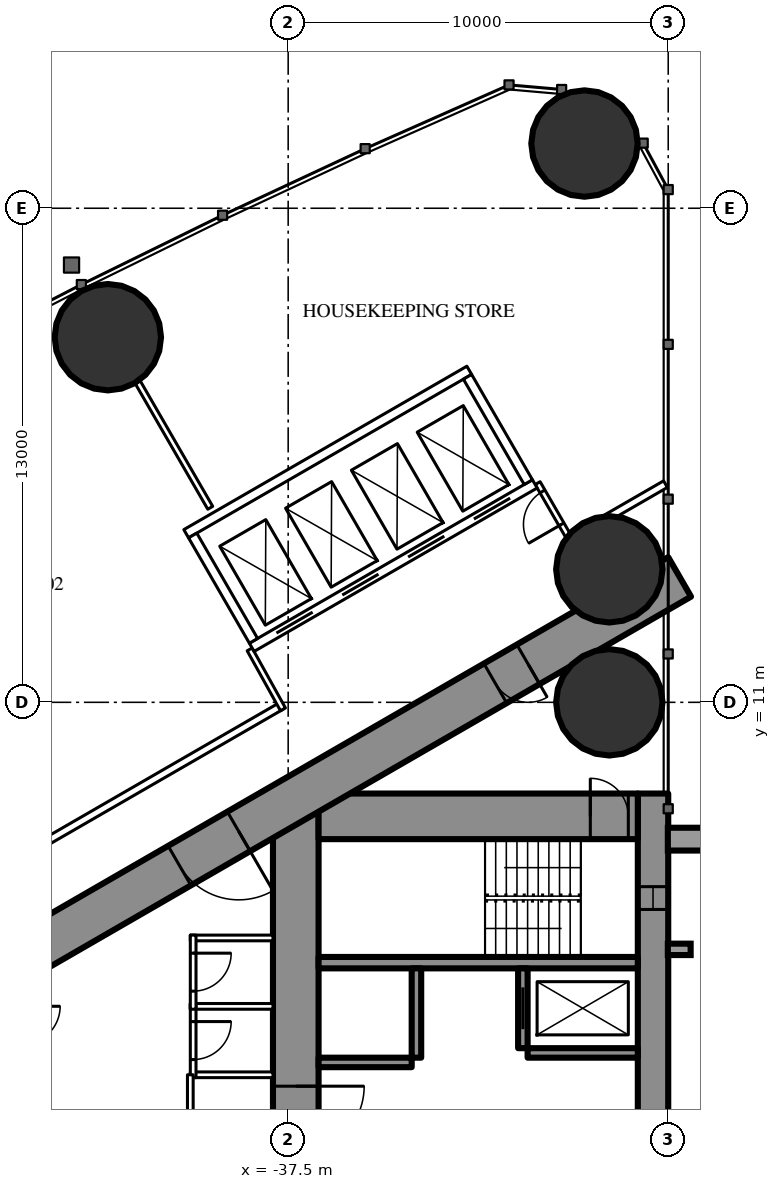
"""IFC4 building model, lengths in metres.
Left out: names, types, materials, properties, quantities, classifications, styles, units other than length and angle.
Written with IfcOpenShell. Run it as: python <this file> out.ifc"""

import sys

from ifc_helpers import new_model, si_unit, direction, frame, frame_2d, origin, origin_2d, place, context, subcontext, project, spatial, rectangle, hollow_circle, extrude, element, fill, save


model = new_model("IFC4")
c1 = context("Model", 3, precision=1e-05, world=origin(), true_north=direction((0.0, 1.0)))
c2 = subcontext(c1, "Body", "Model", "MODEL_VIEW")
j1 = project(units=[si_unit("LENGTHUNIT", "METRE"), si_unit("PLANEANGLEUNIT", "RADIAN")], contexts=[c1])
p1 = place(None, origin())
s1 = spatial("IfcSite", under=j1, at=p1, CompositionType="ELEMENT")
p2 = place(p1, origin())
s2 = spatial("IfcBuilding", under=s1, at=p2, CompositionType="ELEMENT")
p3 = place(p2, frame((0.0, 0.0, 21.5)))
s3 = spatial("IfcBuildingStorey", under=s2, at=p3, CompositionType="ELEMENT", Elevation=21.5)
for number, where, z_axis, x_axis in (
    (1, (-29.703, 25.703, 0.0), (0.0, 0.0, 1.0), (1.0, 0.0, 0.0)),
    (2, (-29.05, 11.0, 0.0), (0.0, 0.0, 1.0), (1.0, 0.0, 0.0)),
    (3, (-29.05, 14.5, 0.0), (0.0, 0.0, 1.0), (1.0, 0.0, 0.0)),
    (4, (-42.245, 20.607, 0.0), (0.0, 0.0, 1.0), (1.0, 0.0, 0.0)),
):
    element("IfcColumn", number, at=place(p3, frame(where, z_axis=z_axis, x_axis=x_axis)), inside=s3, PredefinedType="COLUMN", context=c2, shape_type="SweptSolid", body=[
        extrude(hollow_circle(Radius=1.4, WallThickness=0.12, at=origin_2d()), origin(), (0.0, 0.0, 1.0), 3.5),
    ])
p4 = place(p3, frame((-27.9, 8.6, 0.0), z_axis=(0.0, 0.0, 1.0), x_axis=(0.0, -1.0, 0.0)))
e5 = element("IfcWall", 5, at=p4, inside=s3, PredefinedType="SHEAR", context=c2, shape_type="SweptSolid", body=[
    extrude(rectangle(XDim=17.2, YDim=0.8, at=frame_2d((8.6, 0.0))), origin(), (0.0, 0.0, 1.0), 3.5),
])
p5 = place(p4, frame((2.45, 0.0, 0.6)))
e6 = element("IfcOpeningElement", 6, at=p5, cuts=e5, PredefinedType="OPENING", context=c2, shape_type="SweptSolid", body=[
    extrude(rectangle(XDim=0.6, YDim=2.1, at=frame_2d((0.3, 1.05))), frame((0.0, 0.41, 0.0), z_axis=(0.0, -1.0, 0.0), x_axis=(1.0, 0.0, 0.0)), (0.0, 0.0, 1.0), 0.82),
])
p6 = place(p4, frame((14.15, 0.0, 0.6)))
e7 = element("IfcOpeningElement", 7, at=p6, cuts=e5, PredefinedType="OPENING", context=c2, shape_type="SweptSolid", body=[
    extrude(rectangle(XDim=0.6, YDim=2.1, at=frame_2d((0.3, 1.05))), frame((0.0, 0.41, 0.0), z_axis=(0.0, -1.0, 0.0), x_axis=(1.0, 0.0, 0.0)), (0.0, 0.0, 1.0), 0.82),
])
p7 = place(p3, frame((-37.3, 8.6, 0.0), z_axis=(0.0, 0.0, 1.0), x_axis=(0.0, -1.0, 0.0)))
e8 = element("IfcWall", 8, at=p7, inside=s3, PredefinedType="SHEAR", context=c2, shape_type="SweptSolid", body=[
    extrude(rectangle(XDim=17.2, YDim=1.2, at=frame_2d((8.6, 0.0))), origin(), (0.0, 0.0, 1.0), 3.5),
])
p8 = place(p7, frame((7.7, 0.0, 0.0)))
e9 = element("IfcOpeningElement", 9, at=p8, cuts=e8, PredefinedType="OPENING", context=c2, shape_type="SweptSolid", body=[
    extrude(rectangle(XDim=1.8, YDim=2.2, at=frame_2d((0.9, 1.1))), frame((0.0, 0.61, 0.0), z_axis=(0.0, -1.0, 0.0), x_axis=(1.0, 0.0, 0.0)), (0.0, 0.0, 1.0), 1.22),
])
p9 = place(p3, frame((-28.3, 8.0, 0.0), z_axis=(0.0, 0.0, 1.0), x_axis=(-1.0, 0.0, 0.0)))
e10 = element("IfcWall", 10, at=p9, inside=s3, PredefinedType="SHEAR", context=c2, shape_type="SweptSolid", body=[
    extrude(rectangle(XDim=8.4, YDim=1.2, at=frame_2d((4.2, 0.0))), origin(), (0.0, 0.0, 1.0), 3.5),
])
p10 = place(p9, frame((0.25, 0.0, 0.0)))
e11 = element("IfcOpeningElement", 11, at=p10, cuts=e10, PredefinedType="OPENING", context=c2, shape_type="SweptSolid", body=[
    extrude(rectangle(XDim=1.0, YDim=2.2, at=frame_2d((0.5, 1.1))), frame((0.0, 0.61, 0.0), z_axis=(0.0, -1.0, 0.0), x_axis=(1.0, 0.0, 0.0)), (0.0, 0.0, 1.0), 1.22),
])
p11 = place(p3, frame((-28.3, 4.15, 0.0), z_axis=(0.0, 0.0, 1.0), x_axis=(-1.0, 0.0, 0.0)))
e12 = element("IfcWall", 12, at=p11, inside=s3, PredefinedType="SHEAR", context=c2, shape_type="SweptSolid", body=[
    extrude(rectangle(XDim=8.4, YDim=0.3, at=frame_2d((4.2, 0.0))), origin(), (0.0, 0.0, 1.0), 3.5),
])
p12 = place(p3, frame((-31.325, 4.0, 0.0), z_axis=(0.0, 0.0, 1.0), x_axis=(0.0, -1.0, 0.0)))
e13 = element("IfcWall", 13, at=p12, inside=s3, PredefinedType="SHEAR", context=c2, shape_type="SweptSolid", body=[
    extrude(rectangle(XDim=2.1, YDim=0.25, at=frame_2d((1.05, 0.0))), origin(), (0.0, 0.0, 1.0), 3.5),
])
p13 = place(p12, frame((0.5, 0.0, 0.0)))
e14 = element("IfcOpeningElement", 14, at=p13, cuts=e13, PredefinedType="OPENING", context=c2, shape_type="SweptSolid", body=[
    extrude(rectangle(XDim=1.1, YDim=2.2, at=frame_2d((0.55, 1.1))), frame((0.0, 0.135, 0.0), z_axis=(0.0, -1.0, 0.0), x_axis=(1.0, 0.0, 0.0)), (0.0, 0.0, 1.0), 0.27),
])
p14 = place(p3, frame((-34.125, 4.0, 0.0), z_axis=(0.0, 0.0, 1.0), x_axis=(0.0, -1.0, 0.0)))
e15 = element("IfcWall", 15, at=p14, inside=s3, PredefinedType="SHEAR", context=c2, shape_type="SweptSolid", body=[
    extrude(rectangle(XDim=2.35, YDim=0.25, at=frame_2d((1.175, 0.0))), origin(), (0.0, 0.0, 1.0), 3.5),
])
p15 = place(p3, frame((-28.3, 1.775, 0.0), z_axis=(0.0, 0.0, 1.0), x_axis=(-1.0, 0.0, 0.0)))
e16 = element("IfcWall", 16, at=p15, inside=s3, PredefinedType="SHEAR", context=c2, shape_type="SweptSolid", body=[
    extrude(rectangle(XDim=2.9, YDim=0.25, at=frame_2d((1.45, 0.0))), origin(), (0.0, 0.0, 1.0), 3.5),
])
p16 = place(p3, frame((-34.25, 1.525, 0.0), z_axis=(0.0, 0.0, 1.0), x_axis=(-1.0, 0.0, 0.0)))
e17 = element("IfcWall", 17, at=p16, inside=s3, PredefinedType="SHEAR", context=c2, shape_type="SweptSolid", body=[
    extrude(rectangle(XDim=2.45, YDim=0.25, at=frame_2d((1.225, 0.0))), origin(), (0.0, 0.0, 1.0), 3.5),
])
p17 = place(p3, frame((-27.2, 14.3, 0.0), z_axis=(0.0, 0.0, 1.0), x_axis=(-0.866026593062, -0.499997940104, 0.0)))
e18 = element("IfcWall", 18, at=p17, inside=s3, PredefinedType="SHEAR", context=c2, shape_type="SweptSolid", body=[
    extrude(rectangle(XDim=28.946, YDim=1.2, at=frame_2d((14.473, 0.0))), origin(), (0.0, 0.0, 1.0), 3.5),
])
p18 = place(p17, frame((4.6, 0.0, 0.0)))
e19 = element("IfcOpeningElement", 19, at=p18, cuts=e18, PredefinedType="OPENING", context=c2, shape_type="SweptSolid", body=[
    extrude(rectangle(XDim=1.0, YDim=2.2, at=frame_2d((0.5, 1.1))), frame((0.0, 0.61, 0.0), z_axis=(0.0, -1.0, 0.0), x_axis=(1.0, 0.0, 0.0)), (0.0, 0.0, 1.0), 1.22),
])
p19 = place(p17, frame((13.395, 0.0, 0.0)))
e20 = element("IfcOpeningElement", 20, at=p19, cuts=e18, PredefinedType="OPENING", context=c2, shape_type="SweptSolid", body=[
    extrude(rectangle(XDim=1.8, YDim=2.2, at=frame_2d((0.9, 1.1))), frame((0.0, 0.61, 0.0), z_axis=(0.0, -1.0, 0.0), x_axis=(1.0, 0.0, 0.0)), (0.0, 0.0, 1.0), 1.22),
])
p20 = place(p3, frame((-39.551, 16.119, 0.0), z_axis=(0.0, 0.0, 1.0), x_axis=(-0.500014214979, 0.866017196607, 0.0)))
e21 = element("IfcWall", 21, at=p20, inside=s3, PredefinedType="PARTITIONING", context=c2, shape_type="SweptSolid", body=[
    extrude(rectangle(XDim=3.815, YDim=0.15, at=frame_2d((1.907, 0.0))), origin(), (0.0, 0.0, 1.0), 3.25),
])
p21 = place(p3, frame((-27.572, 16.741, 0.0), z_axis=(0.0, 0.0, 1.0), x_axis=(-0.866034618596, -0.499984039138, 0.0)))
e22 = element("IfcWall", 22, at=p21, inside=s3, PredefinedType="PARTITIONING", context=c2, shape_type="SweptSolid", body=[
    extrude(rectangle(XDim=2.854, YDim=0.2, at=frame_2d((1.427, 0.0))), origin(), (0.0, 0.0, 1.0), 3.25),
])
p22 = place(p3, frame((-37.7, 10.894, 0.0), z_axis=(0.0, 0.0, 1.0), x_axis=(-0.866027905338, -0.499995667157, 0.0)))
e23 = element("IfcWall", 23, at=p22, inside=s3, PredefinedType="PARTITIONING", context=c2, shape_type="SweptSolid", body=[
    extrude(rectangle(XDim=21.787, YDim=0.2, at=frame_2d((10.894, 0.0))), origin(), (0.0, 0.0, 1.0), 3.25),
])
p23 = place(p22, frame((11.78, 0.0, 0.0)))
e24 = element("IfcOpeningElement", 24, at=p23, cuts=e23, PredefinedType="OPENING", context=c2, shape_type="SweptSolid", body=[
    extrude(rectangle(XDim=0.95, YDim=2.2, at=frame_2d((0.475, 1.1))), frame((0.0, 0.11, 0.0), z_axis=(0.0, -1.0, 0.0), x_axis=(1.0, 0.0, 0.0)), (0.0, 0.0, 1.0), 0.22),
])
p24 = place(p22, frame((7.73, 0.0, 0.0)))
e25 = element("IfcOpeningElement", 25, at=p24, cuts=e23, PredefinedType="OPENING", context=c2, shape_type="SweptSolid", body=[
    extrude(rectangle(XDim=0.95, YDim=2.2, at=frame_2d((0.475, 1.1))), frame((0.0, 0.11, 0.0), z_axis=(0.0, -1.0, 0.0), x_axis=(1.0, 0.0, 0.0)), (0.0, 0.0, 1.0), 0.22),
])
p25 = place(p3, frame((-38.513, 12.392, 0.0), z_axis=(0.0, 0.0, 1.0), x_axis=(0.485585508183, -0.874189175317, 0.0)))
e26 = element("IfcWall", 26, at=p25, inside=s3, PredefinedType="PARTITIONING", context=c2, shape_type="SweptSolid", body=[
    extrude(rectangle(XDim=1.805, YDim=0.15, at=frame_2d((0.902, 0.0))), origin(), (0.0, 0.0, 1.0), 3.25),
])
p26 = place(p3, frame((-30.033, 15.205, 0.0), z_axis=(0.0, 0.0, 1.0), x_axis=(-0.499980071345, 0.866036909293, 0.0)))
e27 = element("IfcWall", 27, at=p26, inside=s3, PredefinedType="PARTITIONING", context=c2, shape_type="SweptSolid", body=[
    extrude(rectangle(XDim=1.805, YDim=0.15, at=frame_2d((0.902, 0.0))), origin(), (0.0, 0.0, 1.0), 3.25),
])
p27 = place(p26, frame((0.552, 0.0, 0.0)))
e28 = element("IfcOpeningElement", 28, at=p27, cuts=e27, PredefinedType="OPENING", context=c2, shape_type="SweptSolid", body=[
    extrude(rectangle(XDim=1.0, YDim=2.2, at=frame_2d((0.5, 1.1))), frame((0.0, 0.085, 0.0), z_axis=(0.0, -1.0, 0.0), x_axis=(1.0, 0.0, 0.0)), (0.0, 0.0, 1.0), 0.17),
])
for number, where, z_axis, x_axis in (
    (29, (-37.9, 1.2, 0.0), (0.0, 0.0, 1.0), (-1.0, 0.0, 0.0)),
    (30, (-37.9, 3.0, 0.0), (0.0, 0.0, 1.0), (-1.0, 0.0, 0.0)),
    (31, (-37.9, 4.8, 0.0), (0.0, 0.0, 1.0), (-1.0, 0.0, 0.0)),
):
    element("IfcWall", number, at=place(p3, frame(where, z_axis=z_axis, x_axis=x_axis)), inside=s3, PredefinedType="PARTITIONING", context=c2, shape_type="SweptSolid", body=[
        extrude(rectangle(XDim=2.175, YDim=0.15, at=frame_2d((1.087, 0.0))), origin(), (0.0, 0.0, 1.0), 3.25),
    ])
p28 = place(p3, frame((-40.0, 3.075, 0.0), z_axis=(0.0, 0.0, 1.0), x_axis=(0.0, -1.0, 0.0)))
e32 = element("IfcWall", 32, at=p28, inside=s3, PredefinedType="PARTITIONING", context=c2, shape_type="SweptSolid", body=[
    extrude(rectangle(XDim=1.95, YDim=0.15, at=frame_2d((0.975, 0.0))), origin(), (0.0, 0.0, 1.0), 3.25),
])
p29 = place(p28, frame((0.475, 0.0, 0.0)))
e33 = element("IfcOpeningElement", 33, at=p29, cuts=e32, PredefinedType="OPENING", context=c2, shape_type="SweptSolid", body=[
    extrude(rectangle(XDim=1.0, YDim=2.2, at=frame_2d((0.5, 1.1))), frame((0.0, 0.085, 0.0), z_axis=(0.0, -1.0, 0.0), x_axis=(1.0, 0.0, 0.0)), (0.0, 0.0, 1.0), 0.17),
])
p30 = place(p3, frame((-40.0, 4.875, 0.0), z_axis=(0.0, 0.0, 1.0), x_axis=(0.0, -1.0, 0.0)))
e34 = element("IfcWall", 34, at=p30, inside=s3, PredefinedType="PARTITIONING", context=c2, shape_type="SweptSolid", body=[
    extrude(rectangle(XDim=1.95, YDim=0.15, at=frame_2d((0.975, 0.0))), origin(), (0.0, 0.0, 1.0), 3.25),
])
p31 = place(p30, frame((0.475, 0.0, 0.0)))
e35 = element("IfcOpeningElement", 35, at=p31, cuts=e34, PredefinedType="OPENING", context=c2, shape_type="SweptSolid", body=[
    extrude(rectangle(XDim=1.0, YDim=2.2, at=frame_2d((0.5, 1.1))), frame((0.0, 0.085, 0.0), z_axis=(0.0, -1.0, 0.0), x_axis=(1.0, 0.0, 0.0)), (0.0, 0.0, 1.0), 0.17),
])
p32 = place(p3, frame((-40.075, 1.2, 0.0), z_axis=(0.0, 0.0, 1.0), x_axis=(0.0, -1.0, 0.0)))
e36 = element("IfcWall", 36, at=p32, inside=s3, PredefinedType="PARTITIONING", context=c2, shape_type="SweptSolid", body=[
    extrude(rectangle(XDim=7.374, YDim=0.15, at=frame_2d((3.687, 0.0))), origin(), (0.0, 0.0, 1.0), 3.25),
])
p33 = place(p32, frame((2.787, 0.0, 0.0)))
e37 = element("IfcOpeningElement", 37, at=p33, cuts=e36, PredefinedType="OPENING", context=c2, shape_type="SweptSolid", body=[
    extrude(rectangle(XDim=1.8, YDim=2.2, at=frame_2d((0.9, 1.1))), frame((0.0, 0.085, 0.0), z_axis=(0.0, -1.0, 0.0), x_axis=(1.0, 0.0, 0.0)), (0.0, 0.0, 1.0), 0.17),
])
p34 = place(p3, frame((-31.01, 16.747, 0.0), z_axis=(0.0, 0.0, 1.0), x_axis=(-0.866028165386, -0.499995216735, 0.0)))
e38 = element("IfcWall", 38, at=p34, inside=s3, PredefinedType="PARTITIONING", context=c2, shape_type="SweptSolid", body=[
    extrude(rectangle(XDim=8.6, YDim=0.25, at=frame_2d((4.3, 0.0))), origin(), (0.0, 0.0, 1.0), 3.25),
])
p35 = place(p34, frame((0.75, 0.0, 0.0)))
e39 = element("IfcOpeningElement", 39, at=p35, cuts=e38, PredefinedType="OPENING", context=c2, shape_type="SweptSolid", body=[
    extrude(rectangle(XDim=1.1, YDim=2.2, at=frame_2d((0.55, 1.1))), frame((0.0, 0.135, 0.0), z_axis=(0.0, -1.0, 0.0), x_axis=(1.0, 0.0, 0.0)), (0.0, 0.0, 1.0), 0.27),
])
p36 = place(p34, frame((2.75, 0.0, 0.0)))
e40 = element("IfcOpeningElement", 40, at=p36, cuts=e38, PredefinedType="OPENING", context=c2, shape_type="SweptSolid", body=[
    extrude(rectangle(XDim=1.1, YDim=2.2, at=frame_2d((0.55, 1.1))), frame((0.0, 0.135, 0.0), z_axis=(0.0, -1.0, 0.0), x_axis=(1.0, 0.0, 0.0)), (0.0, 0.0, 1.0), 0.27),
])
p37 = place(p34, frame((4.75, 0.0, 0.0)))
e41 = element("IfcOpeningElement", 41, at=p37, cuts=e38, PredefinedType="OPENING", context=c2, shape_type="SweptSolid", body=[
    extrude(rectangle(XDim=1.1, YDim=2.2, at=frame_2d((0.55, 1.1))), frame((0.0, 0.135, 0.0), z_axis=(0.0, -1.0, 0.0), x_axis=(1.0, 0.0, 0.0)), (0.0, 0.0, 1.0), 0.27),
])
p38 = place(p34, frame((6.75, 0.0, 0.0)))
e42 = element("IfcOpeningElement", 42, at=p38, cuts=e38, PredefinedType="OPENING", context=c2, shape_type="SweptSolid", body=[
    extrude(rectangle(XDim=1.1, YDim=2.2, at=frame_2d((0.55, 1.1))), frame((0.0, 0.135, 0.0), z_axis=(0.0, -1.0, 0.0), x_axis=(1.0, 0.0, 0.0)), (0.0, 0.0, 1.0), 0.27),
])
p39 = place(p3, frame((-32.736, 19.736, 0.0), z_axis=(0.0, 0.0, 1.0), x_axis=(-0.866028165386, -0.499995216735, 0.0)))
e43 = element("IfcWall", 43, at=p39, inside=s3, PredefinedType="PARTITIONING", context=c2, shape_type="SweptSolid", body=[
    extrude(rectangle(XDim=8.6, YDim=0.25, at=frame_2d((4.3, 0.0))), origin(), (0.0, 0.0, 1.0), 3.25),
])
p40 = place(p3, frame((-31.181, 16.793, 0.0), z_axis=(0.0, 0.0, 1.0), x_axis=(-0.499929347863, 0.866066190972, 0.0)))
e44 = element("IfcWall", 44, at=p40, inside=s3, PredefinedType="PARTITIONING", context=c2, shape_type="SweptSolid", body=[
    extrude(rectangle(XDim=3.201, YDim=0.25, at=frame_2d((1.6, 0.0))), origin(), (0.0, 0.0, 1.0), 3.25),
])
p41 = place(p3, frame((-38.413, 12.618, 0.0), z_axis=(0.0, 0.0, 1.0), x_axis=(-0.499872130319, 0.866099216793, 0.0)))
e45 = element("IfcWall", 45, at=p41, inside=s3, PredefinedType="PARTITIONING", context=c2, shape_type="SweptSolid", body=[
    extrude(rectangle(XDim=3.2, YDim=0.25, at=frame_2d((1.6, 0.0))), origin(), (0.0, 0.0, 1.0), 3.25),
])
p42 = place(p27, origin())
e46 = element("IfcDoor", 46, at=p42, inside=s3, OperationType="SINGLE_SWING_LEFT", PredefinedType="DOOR", context=c2, shape_type="SweptSolid", body=[
    extrude(rectangle(XDim=1.0, YDim=2.2, at=frame_2d((0.5, 1.1))), frame((0.0, 0.025, 0.0), z_axis=(0.0, -1.0, 0.0), x_axis=(1.0, 0.0, 0.0)), (0.0, 0.0, 1.0), 0.05),
])
fill(e28, e46)
p43 = place(p29, origin())
e47 = element("IfcDoor", 47, at=p43, inside=s3, OperationType="SINGLE_SWING_LEFT", PredefinedType="DOOR", context=c2, shape_type="SweptSolid", body=[
    extrude(rectangle(XDim=1.0, YDim=2.2, at=frame_2d((0.5, 1.1))), frame((0.0, 0.025, 0.0), z_axis=(0.0, -1.0, 0.0), x_axis=(1.0, 0.0, 0.0)), (0.0, 0.0, 1.0), 0.05),
])
fill(e33, e47)
p44 = place(p31, origin())
e48 = element("IfcDoor", 48, at=p44, inside=s3, OperationType="SINGLE_SWING_LEFT", PredefinedType="DOOR", context=c2, shape_type="SweptSolid", body=[
    extrude(rectangle(XDim=1.0, YDim=2.2, at=frame_2d((0.5, 1.1))), frame((0.0, 0.025, 0.0), z_axis=(0.0, -1.0, 0.0), x_axis=(1.0, 0.0, 0.0)), (0.0, 0.0, 1.0), 0.05),
])
fill(e35, e48)
p45 = place(p18, origin())
e49 = element("IfcDoor", 49, at=p45, inside=s3, OperationType="SINGLE_SWING_LEFT", PredefinedType="DOOR", context=c2, shape_type="SweptSolid", body=[
    extrude(rectangle(XDim=1.0, YDim=2.2, at=frame_2d((0.5, 1.1))), frame((0.0, 0.025, 0.0), z_axis=(0.0, -1.0, 0.0), x_axis=(1.0, 0.0, 0.0)), (0.0, 0.0, 1.0), 0.05),
])
fill(e19, e49)
p46 = place(p19, origin())
e50 = element("IfcDoor", 50, at=p46, inside=s3, OperationType="DOUBLE_DOOR_SINGLE_SWING", PredefinedType="DOOR", context=c2, shape_type="SweptSolid", body=[
    extrude(rectangle(XDim=1.8, YDim=2.2, at=frame_2d((0.9, 1.1))), frame((0.0, 0.025, 0.0), z_axis=(0.0, -1.0, 0.0), x_axis=(1.0, 0.0, 0.0)), (0.0, 0.0, 1.0), 0.05),
])
fill(e20, e50)
p47 = place(p8, origin())
e51 = element("IfcDoor", 51, at=p47, inside=s3, OperationType="DOUBLE_DOOR_SINGLE_SWING", PredefinedType="DOOR", context=c2, shape_type="SweptSolid", body=[
    extrude(rectangle(XDim=1.8, YDim=2.2, at=frame_2d((0.9, 1.1))), frame((0.0, 0.025, 0.0), z_axis=(0.0, -1.0, 0.0), x_axis=(1.0, 0.0, 0.0)), (0.0, 0.0, 1.0), 0.05),
])
fill(e9, e51)
p48 = place(p10, origin())
e52 = element("IfcDoor", 52, at=p48, inside=s3, OperationType="SINGLE_SWING_RIGHT", PredefinedType="DOOR", context=c2, shape_type="SweptSolid", body=[
    extrude(rectangle(XDim=1.0, YDim=2.2, at=frame_2d((0.5, 1.1))), frame((0.0, 0.025, 0.0), z_axis=(0.0, -1.0, 0.0), x_axis=(1.0, 0.0, 0.0)), (0.0, 0.0, 1.0), 0.05),
])
fill(e11, e52)
p49 = place(p13, origin())
e53 = element("IfcDoor", 53, at=p49, inside=s3, OperationType="SLIDING_TO_LEFT", PredefinedType="USERDEFINED", context=c2, shape_type="SweptSolid", body=[
    extrude(rectangle(XDim=1.1, YDim=2.2, at=frame_2d((0.55, 1.1))), frame((0.0, 0.025, 0.0), z_axis=(0.0, -1.0, 0.0), x_axis=(1.0, 0.0, 0.0)), (0.0, 0.0, 1.0), 0.05),
])
fill(e14, e53)
p50 = place(p35, origin())
e54 = element("IfcDoor", 54, at=p50, inside=s3, OperationType="DOUBLE_DOOR_SLIDING", PredefinedType="USERDEFINED", context=c2, shape_type="SweptSolid", body=[
    extrude(rectangle(XDim=1.1, YDim=2.2, at=frame_2d((0.55, 1.1))), frame((0.0, 0.025, 0.0), z_axis=(0.0, -1.0, 0.0), x_axis=(1.0, 0.0, 0.0)), (0.0, 0.0, 1.0), 0.05),
])
fill(e39, e54)
p51 = place(p36, origin())
e55 = element("IfcDoor", 55, at=p51, inside=s3, OperationType="DOUBLE_DOOR_SLIDING", PredefinedType="USERDEFINED", context=c2, shape_type="SweptSolid", body=[
    extrude(rectangle(XDim=1.1, YDim=2.2, at=frame_2d((0.55, 1.1))), frame((0.0, 0.025, 0.0), z_axis=(0.0, -1.0, 0.0), x_axis=(1.0, 0.0, 0.0)), (0.0, 0.0, 1.0), 0.05),
])
fill(e40, e55)
p52 = place(p37, origin())
e56 = element("IfcDoor", 56, at=p52, inside=s3, OperationType="DOUBLE_DOOR_SLIDING", PredefinedType="USERDEFINED", context=c2, shape_type="SweptSolid", body=[
    extrude(rectangle(XDim=1.1, YDim=2.2, at=frame_2d((0.55, 1.1))), frame((0.0, 0.025, 0.0), z_axis=(0.0, -1.0, 0.0), x_axis=(1.0, 0.0, 0.0)), (0.0, 0.0, 1.0), 0.05),
])
fill(e41, e56)
p53 = place(p38, origin())
e57 = element("IfcDoor", 57, at=p53, inside=s3, OperationType="DOUBLE_DOOR_SLIDING", PredefinedType="USERDEFINED", context=c2, shape_type="SweptSolid", body=[
    extrude(rectangle(XDim=1.1, YDim=2.2, at=frame_2d((0.55, 1.1))), frame((0.0, 0.025, 0.0), z_axis=(0.0, -1.0, 0.0), x_axis=(1.0, 0.0, 0.0)), (0.0, 0.0, 1.0), 0.05),
])
fill(e42, e57)
p54 = place(p5, origin())
e58 = element("IfcWindow", 58, at=p54, inside=s3, PartitioningType="SINGLE_PANEL", PredefinedType="WINDOW", context=c2, shape_type="SweptSolid", body=[
    extrude(rectangle(XDim=0.6, YDim=2.1, at=frame_2d((0.3, 1.05))), frame((0.0, 0.03, 0.0), z_axis=(0.0, -1.0, 0.0), x_axis=(1.0, 0.0, 0.0)), (0.0, 0.0, 1.0), 0.06),
])
fill(e6, e58)
save(model, sys.argv[1])
